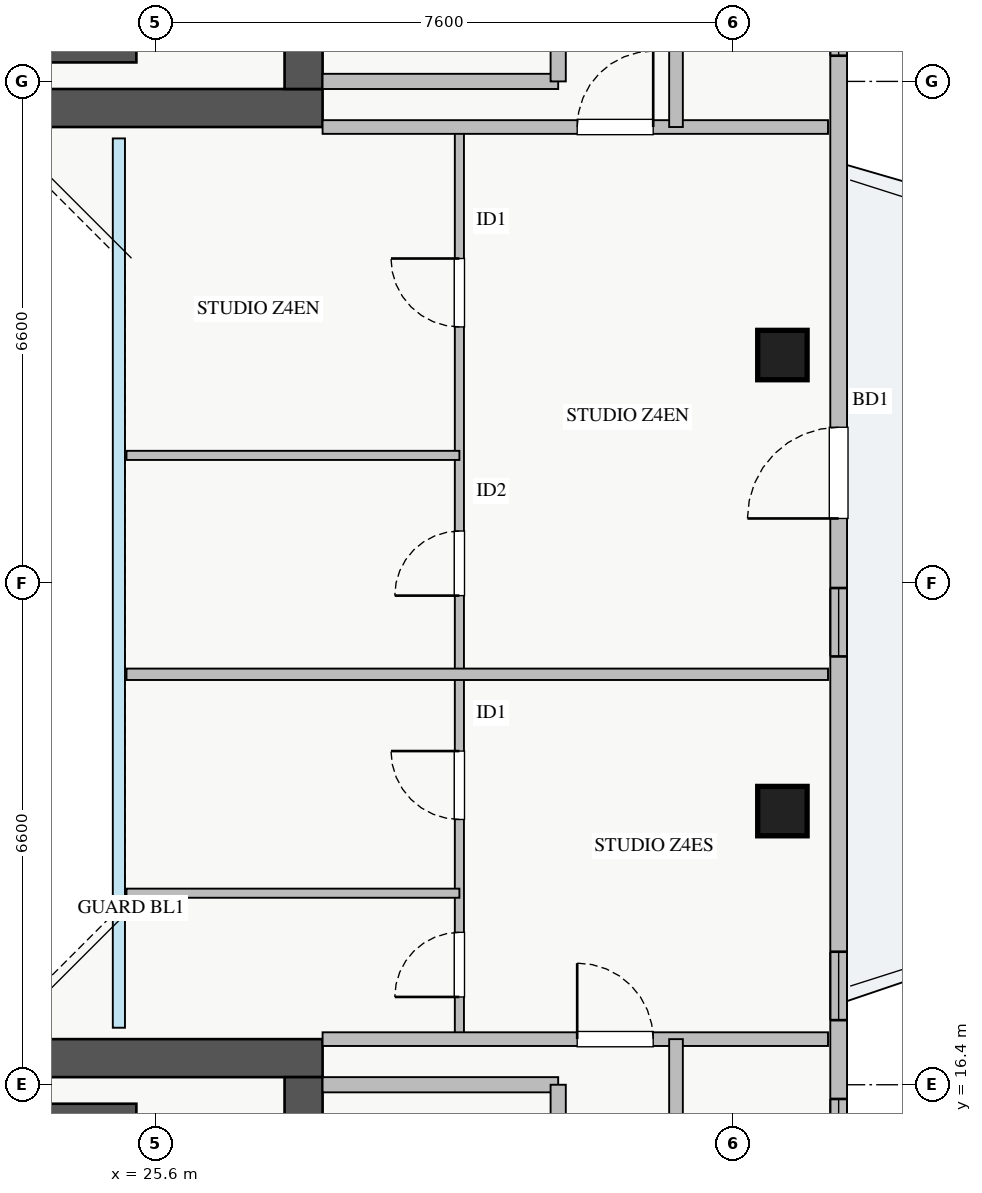
"""IFC4 building model, lengths in metres.
Left out: names, types, materials, properties, quantities, classifications, styles, units other than length and angle.
Written with IfcOpenShell. Run it as: python <this file> out.ifc"""

import sys

from ifc_helpers import new_model, si_unit, direction, frame, frame_2d, origin, origin_2d, place, context, subcontext, project, spatial, rectangle, extrude, source, transform, mapped, element, fill, save


model = new_model("IFC4")
c1 = context("Model", 3, precision=1e-05, world=origin(), true_north=direction((0.0, 1.0)))
c2 = subcontext(c1, "Body", "Model", "MODEL_VIEW")
j1 = project(units=[si_unit("LENGTHUNIT", "METRE"), si_unit("PLANEANGLEUNIT", "RADIAN")], contexts=[c1])
p1 = place(None, origin())
s1 = spatial("IfcSite", under=j1, at=p1, CompositionType="ELEMENT")
p2 = place(p1, origin())
s2 = spatial("IfcBuilding", under=s1, at=p2, CompositionType="ELEMENT")
p3 = place(p2, frame((0.0, 0.0, 250.25)))
s3 = spatial("IfcBuildingStorey", under=s2, at=p3, CompositionType="ELEMENT", Elevation=250.25)
for number, where, z_axis, x_axis in (
    (1, (18.2, 29.95, 0.0), (0.0, 0.0, 1.0), (1.0, 0.0, 0.0)),
    (2, (18.2, 16.05, 0.0), (0.0, 0.0, 1.0), (1.0, 0.0, 0.0)),
):
    element("IfcWall", number, at=place(p3, frame(where, z_axis=z_axis, x_axis=x_axis)), inside=s3, PredefinedType="SHEAR", context=c2, shape_type="SweptSolid", body=[
        extrude(rectangle(XDim=7.15, YDim=0.2, at=frame_2d((3.575, 0.0))), origin(), (0.0, 0.0, 1.0), 3.25),
    ])
p4 = place(p3, frame((10.2, 29.25, 0.0), z_axis=(0.0, 0.0, 1.0), x_axis=(1.0, 0.0, 0.0)))
e3 = element("IfcWall", 3, at=p4, inside=s3, PredefinedType="SHEAR", context=c2, shape_type="SweptSolid", body=[
    extrude(rectangle(XDim=17.6, YDim=0.5, at=frame_2d((8.8, 0.0))), origin(), (0.0, 0.0, 1.0), 3.25),
])
p5 = place(p3, frame((27.55, 29.5, 0.0), z_axis=(0.0, 0.0, 1.0), x_axis=(0.0, 1.0, 0.0)))
e4 = element("IfcWall", 4, at=p5, inside=s3, PredefinedType="SHEAR", context=c2, shape_type="SweptSolid", body=[
    extrude(rectangle(XDim=6.2, YDim=0.5, at=frame_2d((3.1, 0.0))), origin(), (0.0, 0.0, 1.0), 3.25),
])
p6 = place(p5, frame((1.1, 0.0, 0.0)))
e5 = element("IfcOpeningElement", 5, at=p6, cuts=e4, PredefinedType="OPENING", context=c2, shape_type="SweptSolid", body=[
    extrude(rectangle(XDim=1.3, YDim=2.05, at=frame_2d((0.65, 1.025))), frame((0.0, 0.26, 0.0), z_axis=(0.0, -1.0, 0.0), x_axis=(1.0, 0.0, 0.0)), (0.0, 0.0, 1.0), 0.52),
])
p7 = place(p3, frame((10.2, 16.75, 0.0), z_axis=(0.0, 0.0, 1.0), x_axis=(1.0, 0.0, 0.0)))
e6 = element("IfcWall", 6, at=p7, inside=s3, PredefinedType="SHEAR", context=c2, shape_type="SweptSolid", body=[
    extrude(rectangle(XDim=17.6, YDim=0.5, at=frame_2d((8.8, 0.0))), origin(), (0.0, 0.0, 1.0), 3.25),
])
p8 = place(p3, frame((27.55, 10.3, 0.0), z_axis=(0.0, 0.0, 1.0), x_axis=(0.0, 1.0, 0.0)))
e7 = element("IfcWall", 7, at=p8, inside=s3, PredefinedType="SHEAR", context=c2, shape_type="SweptSolid", body=[
    extrude(rectangle(XDim=6.2, YDim=0.5, at=frame_2d((3.1, 0.0))), origin(), (0.0, 0.0, 1.0), 3.25),
])
p9 = place(p8, frame((2.1, 0.0, 0.0)))
e8 = element("IfcOpeningElement", 8, at=p9, cuts=e7, PredefinedType="OPENING", context=c2, shape_type="SweptSolid", body=[
    extrude(rectangle(XDim=1.3, YDim=2.05, at=frame_2d((0.65, 1.025))), frame((0.0, 0.26, 0.0), z_axis=(0.0, -1.0, 0.0), x_axis=(1.0, 0.0, 0.0)), (0.0, 0.0, 1.0), 0.52),
])
m1 = source(origin(), c2, "Body", "SweptSolid", [
    extrude(rectangle(XDim=0.65, YDim=0.65, at=origin_2d()), origin(), (0.0, 0.0, 1.0), 3.25),
])
for number, where, z_axis, x_axis in (
    (9, (33.85, 20.0, 0.0), (0.0, 0.0, 1.0), (1.0, 0.0, 0.0)),
    (10, (33.85, 26.0, 0.0), (0.0, 0.0, 1.0), (1.0, 0.0, 0.0)),
):
    element("IfcColumn", number, at=place(p3, frame(where, z_axis=z_axis, x_axis=x_axis)), inside=s3, PredefinedType="COLUMN", context=c2, shape_type="MappedRepresentation", body=[
        mapped(m1, transform((0.0, 0.0, 0.0), x_axis=(1.0, 0.0, 0.0), y_axis=(0.0, 1.0, 0.0), z_axis=(0.0, 0.0, 1.0), scale=1.0)),
    ])
p10 = place(p3, frame((34.59, 12.35, 0.0), z_axis=(0.0, 0.0, 1.0), x_axis=(0.0, 1.0, 0.0)))
e11 = element("IfcWall", 11, at=p10, inside=s3, PredefinedType="STANDARD", context=c2, shape_type="SweptSolid", body=[
    extrude(rectangle(XDim=21.3, YDim=0.22, at=frame_2d((10.65, 0.0))), origin(), (0.0, 0.0, 1.0), 2.61),
])
p11 = place(p10, frame((11.5, 0.0, 0.0)))
e12 = element("IfcOpeningElement", 12, at=p11, cuts=e11, PredefinedType="OPENING", context=c2, shape_type="SweptSolid", body=[
    extrude(rectangle(XDim=1.2, YDim=2.1, at=frame_2d((0.6, 1.05))), frame((0.0, 0.12, 0.0), z_axis=(0.0, -1.0, 0.0), x_axis=(1.0, 0.0, 0.0)), (0.0, 0.0, 1.0), 0.24),
])
p12 = place(p10, frame((1.463, 0.0, 0.9)))
e13 = element("IfcOpeningElement", 13, at=p12, cuts=e11, PredefinedType="OPENING", context=c2, shape_type="SweptSolid", body=[
    extrude(rectangle(XDim=2.4, YDim=1.48, at=frame_2d((1.2, 0.74))), frame((0.0, 0.12, 0.0), z_axis=(0.0, -1.0, 0.0), x_axis=(1.0, 0.0, 0.0)), (0.0, 0.0, 1.0), 0.24),
])
p13 = place(p10, frame((17.588, 0.0, 0.9)))
e14 = element("IfcOpeningElement", 14, at=p13, cuts=e11, PredefinedType="OPENING", context=c2, shape_type="SweptSolid", body=[
    extrude(rectangle(XDim=2.1, YDim=1.48, at=frame_2d((1.05, 0.74))), frame((0.0, 0.12, 0.0), z_axis=(0.0, -1.0, 0.0), x_axis=(1.0, 0.0, 0.0)), (0.0, 0.0, 1.0), 0.24),
])
p14 = place(p10, frame((4.9, 0.0, 0.9)))
e15 = element("IfcOpeningElement", 15, at=p14, cuts=e11, PredefinedType="OPENING", context=c2, shape_type="SweptSolid", body=[
    extrude(rectangle(XDim=0.9, YDim=1.2, at=frame_2d((0.45, 0.6))), frame((0.0, 0.12, 0.0), z_axis=(0.0, -1.0, 0.0), x_axis=(1.0, 0.0, 0.0)), (0.0, 0.0, 1.0), 0.24),
])
p15 = place(p10, frame((9.685, 0.0, 0.9)))
e16 = element("IfcOpeningElement", 16, at=p15, cuts=e11, PredefinedType="OPENING", context=c2, shape_type="SweptSolid", body=[
    extrude(rectangle(XDim=0.9, YDim=1.2, at=frame_2d((0.45, 0.6))), frame((0.0, 0.12, 0.0), z_axis=(0.0, -1.0, 0.0), x_axis=(1.0, 0.0, 0.0)), (0.0, 0.0, 1.0), 0.24),
])
p16 = place(p3, frame((27.8, 29.6, 0.0), z_axis=(0.0, 0.0, 1.0), x_axis=(1.0, 0.0, 0.0)))
e17 = element("IfcWall", 17, at=p16, inside=s3, PredefinedType="PARTITIONING", context=c2, shape_type="SweptSolid", body=[
    extrude(rectangle(XDim=3.1, YDim=0.2, at=frame_2d((1.55, 0.0))), origin(), (0.0, 0.0, 1.0), 3.07),
])
p17 = place(p3, frame((30.9, 29.6, 0.0), z_axis=(0.0, 0.0, 1.0), x_axis=(0.0, 1.0, 0.0)))
e18 = element("IfcWall", 18, at=p17, inside=s3, PredefinedType="PARTITIONING", context=c2, shape_type="SweptSolid", body=[
    extrude(rectangle(XDim=3.9, YDim=0.2, at=frame_2d((1.95, 0.0))), origin(), (0.0, 0.0, 1.0), 2.765),
])
p18 = place(p17, frame((1.4, 0.0, 0.0)))
e19 = element("IfcOpeningElement", 19, at=p18, cuts=e18, PredefinedType="OPENING", context=c2, shape_type="SweptSolid", body=[
    extrude(rectangle(XDim=1.1, YDim=2.05, at=frame_2d((0.55, 1.025))), frame((0.0, 0.11, 0.0), z_axis=(0.0, -1.0, 0.0), x_axis=(1.0, 0.0, 0.0)), (0.0, 0.0, 1.0), 0.22),
])
p19 = place(p3, frame((27.8, 16.4, 0.0), z_axis=(0.0, 0.0, 1.0), x_axis=(1.0, 0.0, 0.0)))
e20 = element("IfcWall", 20, at=p19, inside=s3, PredefinedType="PARTITIONING", context=c2, shape_type="SweptSolid", body=[
    extrude(rectangle(XDim=3.1, YDim=0.2, at=frame_2d((1.55, 0.0))), origin(), (0.0, 0.0, 1.0), 3.07),
])
p20 = place(p3, frame((30.9, 12.5, 0.0), z_axis=(0.0, 0.0, 1.0), x_axis=(0.0, 1.0, 0.0)))
e21 = element("IfcWall", 21, at=p20, inside=s3, PredefinedType="PARTITIONING", context=c2, shape_type="SweptSolid", body=[
    extrude(rectangle(XDim=3.9, YDim=0.2, at=frame_2d((1.95, 0.0))), origin(), (0.0, 0.0, 1.0), 2.765),
])
p21 = place(p20, frame((1.4, 0.0, 0.0)))
e22 = element("IfcOpeningElement", 22, at=p21, cuts=e21, PredefinedType="OPENING", context=c2, shape_type="SweptSolid", body=[
    extrude(rectangle(XDim=1.1, YDim=2.05, at=frame_2d((0.55, 1.025))), frame((0.0, 0.11, 0.0), z_axis=(0.0, -1.0, 0.0), x_axis=(1.0, 0.0, 0.0)), (0.0, 0.0, 1.0), 0.22),
])
p22 = place(p3, frame((29.6, 17.0, 0.0), z_axis=(0.0, 0.0, 1.0), x_axis=(0.0, 1.0, 0.0)))
e23 = element("IfcWall", 23, at=p22, inside=s3, PredefinedType="PLUMBINGWALL", context=c2, shape_type="SweptSolid", body=[
    extrude(rectangle(XDim=4.8, YDim=0.12, at=frame_2d((2.4, 0.0))), origin(), (0.0, 0.0, 1.0), 3.07),
])
p23 = place(p22, frame((0.555, 0.0, 0.0)))
e24 = element("IfcOpeningElement", 24, at=p23, cuts=e23, PredefinedType="OPENING", context=c2, shape_type="SweptSolid", body=[
    extrude(rectangle(XDim=0.85, YDim=2.05, at=frame_2d((0.425, 1.025))), frame((0.0, 0.07, 0.0), z_axis=(0.0, -1.0, 0.0), x_axis=(1.0, 0.0, 0.0)), (0.0, 0.0, 1.0), 0.14),
])
p24 = place(p22, frame((2.89, 0.0, 0.0)))
e25 = element("IfcOpeningElement", 25, at=p24, cuts=e23, PredefinedType="OPENING", context=c2, shape_type="SweptSolid", body=[
    extrude(rectangle(XDim=0.9, YDim=2.05, at=frame_2d((0.45, 1.025))), frame((0.0, 0.07, 0.0), z_axis=(0.0, -1.0, 0.0), x_axis=(1.0, 0.0, 0.0)), (0.0, 0.0, 1.0), 0.14),
])
p25 = place(p3, frame((25.22, 18.92, 0.0), z_axis=(0.0, 0.0, 1.0), x_axis=(1.0, 0.0, 0.0)))
e26 = element("IfcWall", 26, at=p25, inside=s3, PredefinedType="PLUMBINGWALL", context=c2, shape_type="SweptSolid", body=[
    extrude(rectangle(XDim=4.38, YDim=0.12, at=frame_2d((2.19, 0.0))), origin(), (0.0, 0.0, 1.0), 3.07),
])
p26 = place(p3, frame((29.6, 21.8, 0.0), z_axis=(0.0, 0.0, 1.0), x_axis=(0.0, 1.0, 0.0)))
e27 = element("IfcWall", 27, at=p26, inside=s3, PredefinedType="PLUMBINGWALL", context=c2, shape_type="SweptSolid", body=[
    extrude(rectangle(XDim=7.2, YDim=0.12, at=frame_2d((3.6, 0.0))), origin(), (0.0, 0.0, 1.0), 3.07),
])
p27 = place(p26, frame((1.035, 0.0, 0.0)))
e28 = element("IfcOpeningElement", 28, at=p27, cuts=e27, PredefinedType="OPENING", context=c2, shape_type="SweptSolid", body=[
    extrude(rectangle(XDim=0.85, YDim=2.05, at=frame_2d((0.425, 1.025))), frame((0.0, 0.07, 0.0), z_axis=(0.0, -1.0, 0.0), x_axis=(1.0, 0.0, 0.0)), (0.0, 0.0, 1.0), 0.14),
])
p28 = place(p26, frame((4.57, 0.0, 0.0)))
e29 = element("IfcOpeningElement", 29, at=p28, cuts=e27, PredefinedType="OPENING", context=c2, shape_type="SweptSolid", body=[
    extrude(rectangle(XDim=0.9, YDim=2.05, at=frame_2d((0.45, 1.025))), frame((0.0, 0.07, 0.0), z_axis=(0.0, -1.0, 0.0), x_axis=(1.0, 0.0, 0.0)), (0.0, 0.0, 1.0), 0.14),
])
p29 = place(p3, frame((25.22, 24.68, 0.0), z_axis=(0.0, 0.0, 1.0), x_axis=(1.0, 0.0, 0.0)))
e30 = element("IfcWall", 30, at=p29, inside=s3, PredefinedType="PLUMBINGWALL", context=c2, shape_type="SweptSolid", body=[
    extrude(rectangle(XDim=4.38, YDim=0.12, at=frame_2d((2.19, 0.0))), origin(), (0.0, 0.0, 1.0), 2.821),
])
p30 = place(p3, frame((25.22, 21.8, 0.0), z_axis=(0.0, 0.0, 1.0), x_axis=(1.0, 0.0, 0.0)))
e31 = element("IfcWall", 31, at=p30, inside=s3, PredefinedType="PARTITIONING", context=c2, shape_type="SweptSolid", body=[
    extrude(rectangle(XDim=9.23, YDim=0.15, at=frame_2d((4.615, 0.0))), origin(), (0.0, 0.0, 1.0), 3.07),
])
p31 = place(p3, frame((27.8, 17.0, 0.0), z_axis=(0.0, 0.0, 1.0), x_axis=(1.0, 0.0, 0.0)))
e32 = element("IfcWall", 32, at=p31, inside=s3, PredefinedType="PARTITIONING", context=c2, shape_type="SweptSolid", body=[
    extrude(rectangle(XDim=6.65, YDim=0.18, at=frame_2d((3.325, 0.0))), origin(), (0.0, 0.0, 1.0), 3.07),
])
p32 = place(p31, frame((3.35, 0.0, 0.0)))
e33 = element("IfcOpeningElement", 33, at=p32, cuts=e32, PredefinedType="OPENING", context=c2, shape_type="SweptSolid", body=[
    extrude(rectangle(XDim=1.0, YDim=2.05, at=frame_2d((0.5, 1.025))), frame((0.0, 0.1, 0.0), z_axis=(0.0, -1.0, 0.0), x_axis=(1.0, 0.0, 0.0)), (0.0, 0.0, 1.0), 0.2),
])
p33 = place(p3, frame((27.8, 29.0, 0.0), z_axis=(0.0, 0.0, 1.0), x_axis=(1.0, 0.0, 0.0)))
e34 = element("IfcWall", 34, at=p33, inside=s3, PredefinedType="PARTITIONING", context=c2, shape_type="SweptSolid", body=[
    extrude(rectangle(XDim=6.65, YDim=0.18, at=frame_2d((3.325, 0.0))), origin(), (0.0, 0.0, 1.0), 3.07),
])
p34 = place(p33, frame((3.35, 0.0, 0.0)))
e35 = element("IfcOpeningElement", 35, at=p34, cuts=e34, PredefinedType="OPENING", context=c2, shape_type="SweptSolid", body=[
    extrude(rectangle(XDim=1.0, YDim=2.05, at=frame_2d((0.5, 1.025))), frame((0.0, 0.1, 0.0), z_axis=(0.0, -1.0, 0.0), x_axis=(1.0, 0.0, 0.0)), (0.0, 0.0, 1.0), 0.2),
])
p35 = place(p3, frame((32.45, 29.0, 0.0), z_axis=(0.0, 0.0, 1.0), x_axis=(0.0, 1.0, 0.0)))
e36 = element("IfcWall", 36, at=p35, inside=s3, PredefinedType="PARTITIONING", context=c2, shape_type="SweptSolid", body=[
    extrude(rectangle(XDim=5.18, YDim=0.18, at=frame_2d((2.59, 0.0))), origin(), (0.0, 0.0, 1.0), 3.07),
])
p36 = place(p35, frame((1.25, 0.0, 0.0)))
e37 = element("IfcOpeningElement", 37, at=p36, cuts=e36, PredefinedType="OPENING", context=c2, shape_type="SweptSolid", body=[
    extrude(rectangle(XDim=0.9, YDim=2.05, at=frame_2d((0.45, 1.025))), frame((0.0, 0.1, 0.0), z_axis=(0.0, -1.0, 0.0), x_axis=(1.0, 0.0, 0.0)), (0.0, 0.0, 1.0), 0.2),
])
p37 = place(p3, frame((32.45, 11.82, 0.0), z_axis=(0.0, 0.0, 1.0), x_axis=(0.0, 1.0, 0.0)))
e38 = element("IfcWall", 38, at=p37, inside=s3, PredefinedType="PARTITIONING", context=c2, shape_type="SweptSolid", body=[
    extrude(rectangle(XDim=5.18, YDim=0.18, at=frame_2d((2.59, 0.0))), origin(), (0.0, 0.0, 1.0), 3.07),
])
p38 = place(p37, frame((1.25, 0.0, 0.0)))
e39 = element("IfcOpeningElement", 39, at=p38, cuts=e38, PredefinedType="OPENING", context=c2, shape_type="SweptSolid", body=[
    extrude(rectangle(XDim=0.9, YDim=2.05, at=frame_2d((0.45, 1.025))), frame((0.0, 0.1, 0.0), z_axis=(0.0, -1.0, 0.0), x_axis=(1.0, 0.0, 0.0)), (0.0, 0.0, 1.0), 0.2),
])
m2 = source(origin(), c2, "Body", "SweptSolid", [
    extrude(rectangle(XDim=1.2, YDim=2.1, at=frame_2d((0.6, 1.05))), frame((0.0, 0.025, 0.0), z_axis=(0.0, -1.0, 0.0), x_axis=(1.0, 0.0, 0.0)), (0.0, 0.0, 1.0), 0.05),
])
p39 = place(p11, origin())
e40 = element("IfcDoor", 40, at=p39, inside=s3, OperationType="SINGLE_SWING_LEFT", PredefinedType="DOOR", context=c2, shape_type="MappedRepresentation", body=[
    mapped(m2, transform((0.0, 0.0, 0.0), x_axis=(1.0, 0.0, 0.0), y_axis=(0.0, 1.0, 0.0), z_axis=(0.0, 0.0, 1.0), scale=1.0)),
])
fill(e12, e40)
m3 = source(origin(), c2, "Body", "SweptSolid", [
    extrude(rectangle(XDim=2.4, YDim=1.48, at=frame_2d((1.2, 0.74))), frame((0.0, 0.03, 0.0), z_axis=(0.0, -1.0, 0.0), x_axis=(1.0, 0.0, 0.0)), (0.0, 0.0, 1.0), 0.06),
])
p40 = place(p12, origin())
e41 = element("IfcWindow", 41, at=p40, inside=s3, PartitioningType="TRIPLE_PANEL_VERTICAL", PredefinedType="WINDOW", context=c2, shape_type="MappedRepresentation", body=[
    mapped(m3, transform((0.0, 0.0, 0.0), x_axis=(1.0, 0.0, 0.0), y_axis=(0.0, 1.0, 0.0), z_axis=(0.0, 0.0, 1.0), scale=1.0)),
])
fill(e13, e41)
m4 = source(origin(), c2, "Body", "SweptSolid", [
    extrude(rectangle(XDim=2.1, YDim=1.48, at=frame_2d((1.05, 0.74))), frame((0.0, 0.03, 0.0), z_axis=(0.0, -1.0, 0.0), x_axis=(1.0, 0.0, 0.0)), (0.0, 0.0, 1.0), 0.06),
])
p41 = place(p13, origin())
e42 = element("IfcWindow", 42, at=p41, inside=s3, PartitioningType="TRIPLE_PANEL_VERTICAL", PredefinedType="WINDOW", context=c2, shape_type="MappedRepresentation", body=[
    mapped(m4, transform((0.0, 0.0, 0.0), x_axis=(1.0, 0.0, 0.0), y_axis=(0.0, 1.0, 0.0), z_axis=(0.0, 0.0, 1.0), scale=1.0)),
])
fill(e14, e42)
m5 = source(origin(), c2, "Body", "SweptSolid", [
    extrude(rectangle(XDim=0.85, YDim=2.05, at=frame_2d((0.425, 1.025))), frame((0.0, 0.025, 0.0), z_axis=(0.0, -1.0, 0.0), x_axis=(1.0, 0.0, 0.0)), (0.0, 0.0, 1.0), 0.05),
])
p42 = place(p23, origin())
e43 = element("IfcDoor", 43, at=p42, inside=s3, OperationType="SINGLE_SWING_LEFT", PredefinedType="DOOR", context=c2, shape_type="MappedRepresentation", body=[
    mapped(m5, transform((0.0, 0.0, 0.0), x_axis=(1.0, 0.0, 0.0), y_axis=(0.0, 1.0, 0.0), z_axis=(0.0, 0.0, 1.0), scale=1.0)),
])
fill(e24, e43)
m6 = source(origin(), c2, "Body", "SweptSolid", [
    extrude(rectangle(XDim=0.9, YDim=2.05, at=frame_2d((0.45, 1.025))), frame((0.0, 0.025, 0.0), z_axis=(0.0, -1.0, 0.0), x_axis=(1.0, 0.0, 0.0)), (0.0, 0.0, 1.0), 0.05),
])
p43 = place(p24, origin())
e44 = element("IfcDoor", 44, at=p43, inside=s3, OperationType="SINGLE_SWING_RIGHT", PredefinedType="DOOR", context=c2, shape_type="MappedRepresentation", body=[
    mapped(m6, transform((0.0, 0.0, 0.0), x_axis=(1.0, 0.0, 0.0), y_axis=(0.0, 1.0, 0.0), z_axis=(0.0, 0.0, 1.0), scale=1.0)),
])
fill(e25, e44)
p44 = place(p27, origin())
e45 = element("IfcDoor", 45, at=p44, inside=s3, OperationType="SINGLE_SWING_LEFT", PredefinedType="DOOR", context=c2, shape_type="MappedRepresentation", body=[
    mapped(m5, transform((0.0, 0.0, 0.0), x_axis=(1.0, 0.0, 0.0), y_axis=(0.0, 1.0, 0.0), z_axis=(0.0, 0.0, 1.0), scale=1.0)),
])
fill(e28, e45)
p45 = place(p28, origin())
e46 = element("IfcDoor", 46, at=p45, inside=s3, OperationType="SINGLE_SWING_RIGHT", PredefinedType="DOOR", context=c2, shape_type="MappedRepresentation", body=[
    mapped(m6, transform((0.0, 0.0, 0.0), x_axis=(1.0, 0.0, 0.0), y_axis=(0.0, 1.0, 0.0), z_axis=(0.0, 0.0, 1.0), scale=1.0)),
])
fill(e29, e46)
m7 = source(origin(), c2, "Body", "SweptSolid", [
    extrude(rectangle(XDim=1.0, YDim=2.05, at=frame_2d((0.5, 1.025))), frame((0.0, 0.025, 0.0), z_axis=(0.0, -1.0, 0.0), x_axis=(1.0, 0.0, 0.0)), (0.0, 0.0, 1.0), 0.05),
])
p46 = place(p32, origin())
e47 = element("IfcDoor", 47, at=p46, inside=s3, OperationType="SINGLE_SWING_LEFT", PredefinedType="DOOR", context=c2, shape_type="MappedRepresentation", body=[
    mapped(m7, transform((0.0, 0.0, 0.0), x_axis=(1.0, 0.0, 0.0), y_axis=(0.0, 1.0, 0.0), z_axis=(0.0, 0.0, 1.0), scale=1.0)),
])
fill(e33, e47)
p47 = place(p34, origin())
e48 = element("IfcDoor", 48, at=p47, inside=s3, OperationType="SINGLE_SWING_RIGHT", PredefinedType="DOOR", context=c2, shape_type="MappedRepresentation", body=[
    mapped(m7, transform((0.0, 0.0, 0.0), x_axis=(1.0, 0.0, 0.0), y_axis=(0.0, 1.0, 0.0), z_axis=(0.0, 0.0, 1.0), scale=1.0)),
])
fill(e35, e48)
m8 = source(origin(), c2, "Body", "SweptSolid", [
    extrude(rectangle(XDim=0.9, YDim=1.2, at=frame_2d((0.45, 0.6))), frame((0.0, 0.03, 0.0), z_axis=(0.0, -1.0, 0.0), x_axis=(1.0, 0.0, 0.0)), (0.0, 0.0, 1.0), 0.06),
])
p48 = place(p14, origin())
e49 = element("IfcWindow", 49, at=p48, inside=s3, PartitioningType="SINGLE_PANEL", PredefinedType="WINDOW", context=c2, shape_type="MappedRepresentation", body=[
    mapped(m8, transform((0.0, 0.0, 0.0), x_axis=(1.0, 0.0, 0.0), y_axis=(0.0, 1.0, 0.0), z_axis=(0.0, 0.0, 1.0), scale=1.0)),
])
fill(e15, e49)
p49 = place(p15, origin())
e50 = element("IfcWindow", 50, at=p49, inside=s3, PartitioningType="SINGLE_PANEL", PredefinedType="WINDOW", context=c2, shape_type="MappedRepresentation", body=[
    mapped(m8, transform((0.0, 0.0, 0.0), x_axis=(1.0, 0.0, 0.0), y_axis=(0.0, 1.0, 0.0), z_axis=(0.0, 0.0, 1.0), scale=1.0)),
])
fill(e16, e50)
save(model, sys.argv[1])
